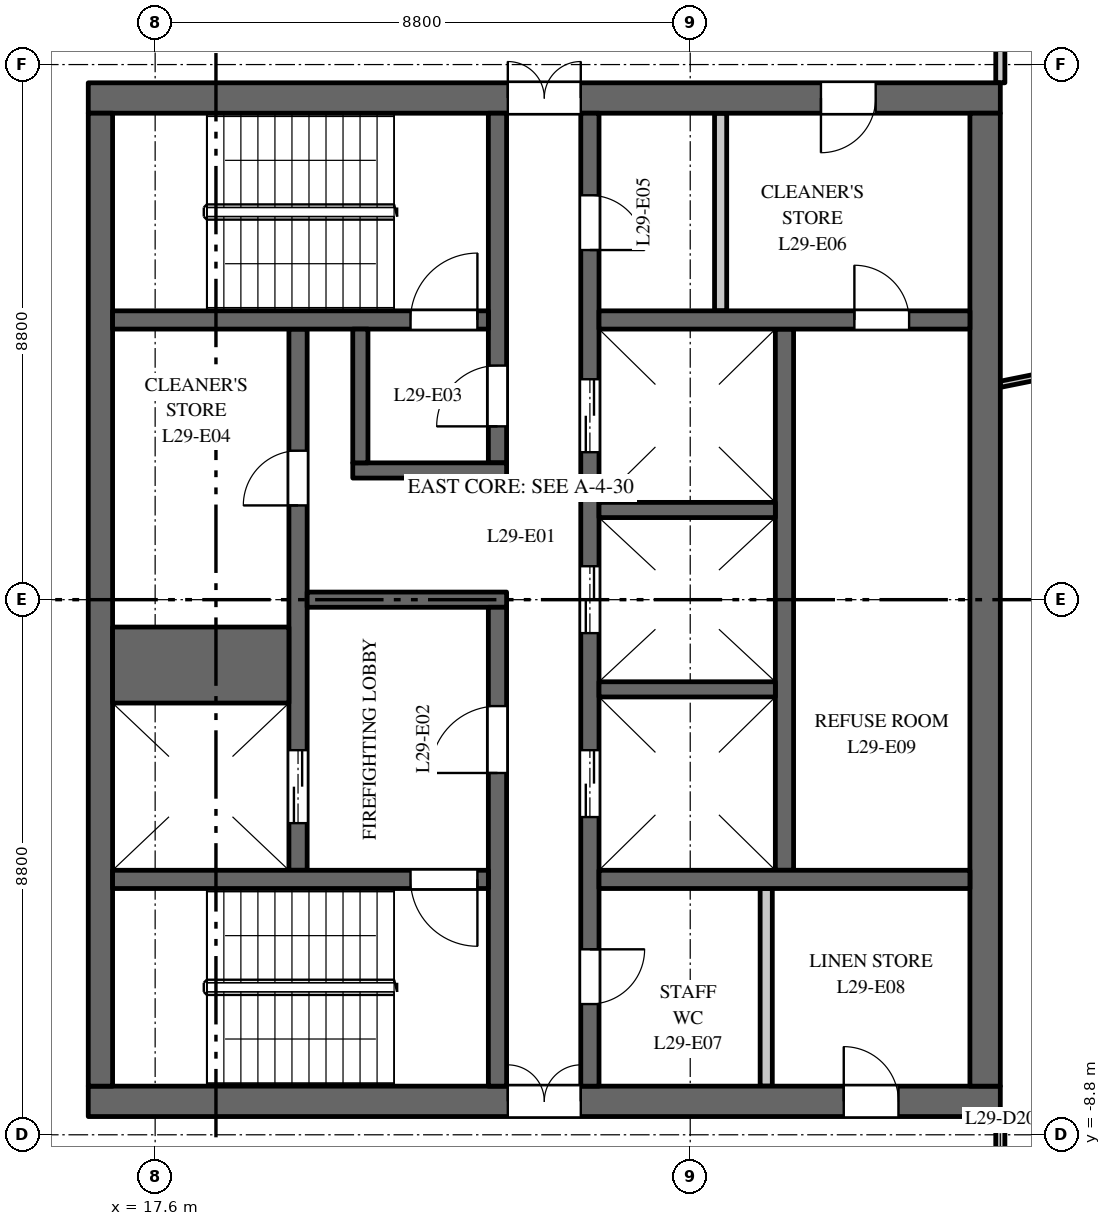
"""IFC4 building model, lengths in metres.
Left out: names, types, materials, properties, quantities, classifications, styles, units other than length and angle.
Written with IfcOpenShell. Run it as: python <this file> out.ifc"""

import sys

from ifc_helpers import new_model, si_unit, direction, frame, frame_2d, origin, place, context, subcontext, project, spatial, rectangle, extrude, element, fill, save


model = new_model("IFC4")
c1 = context("Model", 3, precision=1e-05, world=origin(), true_north=direction((0.0, 1.0)))
c2 = subcontext(c1, "Body", "Model", "MODEL_VIEW")
j1 = project(units=[si_unit("LENGTHUNIT", "METRE"), si_unit("PLANEANGLEUNIT", "RADIAN")], contexts=[c1])
p1 = place(None, origin())
s1 = spatial("IfcSite", under=j1, at=p1, CompositionType="ELEMENT")
p2 = place(p1, origin())
s2 = spatial("IfcBuilding", under=s1, at=p2, CompositionType="ELEMENT")
p3 = place(p2, frame((0.0, 0.0, 128.0)))
s3 = spatial("IfcBuildingStorey", under=s2, at=p3, CompositionType="ELEMENT", Elevation=128.0)
p4 = place(p3, frame((16.5, 8.25, 0.0), z_axis=(0.0, 0.0, 1.0), x_axis=(1.0, 0.0, 0.0)))
e1 = element("IfcWall", 1, at=p4, inside=s3, PredefinedType="SHEAR", context=c2, shape_type="SweptSolid", body=[
    extrude(rectangle(XDim=15.0, YDim=0.5, at=frame_2d((7.5, 0.0))), origin(), (0.0, 0.0, 1.0), 3.7),
])
p5 = place(p4, frame((6.9, 0.0, 0.0)))
e2 = element("IfcOpeningElement", 2, at=p5, cuts=e1, PredefinedType="OPENING", context=c2, shape_type="SweptSolid", body=[
    extrude(rectangle(XDim=1.2, YDim=2.1, at=frame_2d((0.6, 1.05))), frame((0.0, 0.26, 0.0), z_axis=(0.0, -1.0, 0.0), x_axis=(1.0, 0.0, 0.0)), (0.0, 0.0, 1.0), 0.52),
])
p6 = place(p4, frame((12.05, 0.0, 0.0)))
e3 = element("IfcOpeningElement", 3, at=p6, cuts=e1, PredefinedType="OPENING", context=c2, shape_type="SweptSolid", body=[
    extrude(rectangle(XDim=0.9, YDim=2.1, at=frame_2d((0.45, 1.05))), frame((0.0, 0.26, 0.0), z_axis=(0.0, -1.0, 0.0), x_axis=(1.0, 0.0, 0.0)), (0.0, 0.0, 1.0), 0.52),
])
p7 = place(p3, frame((16.5, -8.25, 0.0), z_axis=(0.0, 0.0, 1.0), x_axis=(1.0, 0.0, 0.0)))
e4 = element("IfcWall", 4, at=p7, inside=s3, PredefinedType="SHEAR", context=c2, shape_type="SweptSolid", body=[
    extrude(rectangle(XDim=15.0, YDim=0.5, at=frame_2d((7.5, 0.0))), origin(), (0.0, 0.0, 1.0), 3.7),
])
p8 = place(p7, frame((6.9, 0.0, 0.0)))
e5 = element("IfcOpeningElement", 5, at=p8, cuts=e4, PredefinedType="OPENING", context=c2, shape_type="SweptSolid", body=[
    extrude(rectangle(XDim=1.2, YDim=2.1, at=frame_2d((0.6, 1.05))), frame((0.0, 0.26, 0.0), z_axis=(0.0, -1.0, 0.0), x_axis=(1.0, 0.0, 0.0)), (0.0, 0.0, 1.0), 0.52),
])
p9 = place(p7, frame((12.425, 0.0, 0.0)))
e6 = element("IfcOpeningElement", 6, at=p9, cuts=e4, PredefinedType="OPENING", context=c2, shape_type="SweptSolid", body=[
    extrude(rectangle(XDim=0.9, YDim=2.1, at=frame_2d((0.45, 1.05))), frame((0.0, 0.26, 0.0), z_axis=(0.0, -1.0, 0.0), x_axis=(1.0, 0.0, 0.0)), (0.0, 0.0, 1.0), 0.52),
])
p10 = place(p3, frame((27.95, -4.45, 0.0), z_axis=(0.0, 0.0, 1.0), x_axis=(0.0, 1.0, 0.0)))
e7 = element("IfcWall", 7, at=p10, inside=s3, PredefinedType="SHEAR", context=c2, shape_type="SweptSolid", body=[
    extrude(rectangle(XDim=8.9, YDim=0.3, at=frame_2d((4.45, 0.0))), origin(), (0.0, 0.0, 1.0), 3.7),
])
p11 = place(p3, frame((19.95, -4.45, 0.0), z_axis=(0.0, 0.0, 1.0), x_axis=(0.0, 1.0, 0.0)))
e8 = element("IfcWall", 8, at=p11, inside=s3, PredefinedType="SHEAR", context=c2, shape_type="SweptSolid", body=[
    extrude(rectangle(XDim=8.9, YDim=0.3, at=frame_2d((4.45, 0.0))), origin(), (0.0, 0.0, 1.0), 3.7),
])
p12 = place(p11, frame((0.775, 0.0, 0.0)))
e9 = element("IfcOpeningElement", 9, at=p12, cuts=e8, PredefinedType="OPENING", context=c2, shape_type="SweptSolid", body=[
    extrude(rectangle(XDim=1.2, YDim=2.1, at=frame_2d((0.6, 1.05))), frame((0.0, 0.16, 0.0), z_axis=(0.0, -1.0, 0.0), x_axis=(1.0, 0.0, 0.0)), (0.0, 0.0, 1.0), 0.32),
])
p13 = place(p11, frame((6.0, 0.0, 0.0)))
e10 = element("IfcOpeningElement", 10, at=p13, cuts=e8, PredefinedType="OPENING", context=c2, shape_type="SweptSolid", body=[
    extrude(rectangle(XDim=0.9, YDim=2.1, at=frame_2d((0.45, 1.05))), frame((0.0, 0.16, 0.0), z_axis=(0.0, -1.0, 0.0), x_axis=(1.0, 0.0, 0.0)), (0.0, 0.0, 1.0), 0.32),
])
p14 = place(p3, frame((24.75, -8.0, 0.0), z_axis=(0.0, 0.0, 1.0), x_axis=(0.0, 1.0, 0.0)))
e11 = element("IfcWall", 11, at=p14, inside=s3, PredefinedType="SHEAR", context=c2, shape_type="SweptSolid", body=[
    extrude(rectangle(XDim=16.0, YDim=0.3, at=frame_2d((8.0, 0.0))), origin(), (0.0, 0.0, 1.0), 3.7),
])
p15 = place(p14, frame((4.425, 0.0, 0.0)))
e12 = element("IfcOpeningElement", 12, at=p15, cuts=e11, PredefinedType="OPENING", context=c2, shape_type="SweptSolid", body=[
    extrude(rectangle(XDim=1.1, YDim=2.1, at=frame_2d((0.55, 1.05))), frame((0.0, 0.16, 0.0), z_axis=(0.0, -1.0, 0.0), x_axis=(1.0, 0.0, 0.0)), (0.0, 0.0, 1.0), 0.32),
])
p16 = place(p14, frame((7.45, 0.0, 0.0)))
e13 = element("IfcOpeningElement", 13, at=p16, cuts=e11, PredefinedType="OPENING", context=c2, shape_type="SweptSolid", body=[
    extrude(rectangle(XDim=1.1, YDim=2.1, at=frame_2d((0.55, 1.05))), frame((0.0, 0.16, 0.0), z_axis=(0.0, -1.0, 0.0), x_axis=(1.0, 0.0, 0.0)), (0.0, 0.0, 1.0), 0.32),
])
p17 = place(p14, frame((10.425, 0.0, 0.0)))
e14 = element("IfcOpeningElement", 14, at=p17, cuts=e11, PredefinedType="OPENING", context=c2, shape_type="SweptSolid", body=[
    extrude(rectangle(XDim=1.2, YDim=2.1, at=frame_2d((0.6, 1.05))), frame((0.0, 0.16, 0.0), z_axis=(0.0, -1.0, 0.0), x_axis=(1.0, 0.0, 0.0)), (0.0, 0.0, 1.0), 0.32),
])
p18 = place(p14, frame((13.75, 0.0, 0.0)))
e15 = element("IfcOpeningElement", 15, at=p18, cuts=e11, PredefinedType="OPENING", context=c2, shape_type="SweptSolid", body=[
    extrude(rectangle(XDim=0.9, YDim=2.1, at=frame_2d((0.45, 1.05))), frame((0.0, 0.16, 0.0), z_axis=(0.0, -1.0, 0.0), x_axis=(1.0, 0.0, 0.0)), (0.0, 0.0, 1.0), 0.32),
])
p19 = place(p14, frame((1.35, 0.0, 0.0)))
e16 = element("IfcOpeningElement", 16, at=p19, cuts=e11, PredefinedType="OPENING", context=c2, shape_type="SweptSolid", body=[
    extrude(rectangle(XDim=0.9, YDim=2.1, at=frame_2d((0.45, 1.05))), frame((0.0, 0.16, 0.0), z_axis=(0.0, -1.0, 0.0), x_axis=(1.0, 0.0, 0.0)), (0.0, 0.0, 1.0), 0.32),
])
p20 = place(p3, frame((20.1, 0.0, 0.0), z_axis=(0.0, 0.0, 1.0), x_axis=(1.0, 0.0, 0.0)))
e17 = element("IfcWall", 17, at=p20, inside=s3, PredefinedType="SHEAR", context=c2, shape_type="SweptSolid", body=[
    extrude(rectangle(XDim=3.28, YDim=0.25, at=frame_2d((1.64, 0.0))), origin(), (0.0, 0.0, 1.0), 3.7),
])
p21 = place(p3, frame((16.7, -8.0, 0.0), z_axis=(0.0, 0.0, 1.0), x_axis=(0.0, 1.0, 0.0)))
e18 = element("IfcWall", 18, at=p21, inside=s3, PredefinedType="SHEAR", context=c2, shape_type="SweptSolid", body=[
    extrude(rectangle(XDim=16.0, YDim=0.4, at=frame_2d((8.0, 0.0))), origin(), (0.0, 0.0, 1.0), 3.7),
])
p22 = place(p3, frame((31.25, -8.0, 0.0), z_axis=(0.0, 0.0, 1.0), x_axis=(0.0, 1.0, 0.0)))
e19 = element("IfcWall", 19, at=p22, inside=s3, PredefinedType="SHEAR", context=c2, shape_type="SweptSolid", body=[
    extrude(rectangle(XDim=16.0, YDim=0.5, at=frame_2d((8.0, 0.0))), origin(), (0.0, 0.0, 1.0), 3.7),
])
p23 = place(p3, frame((24.9, 4.6, 0.0), z_axis=(0.0, 0.0, 1.0), x_axis=(1.0, 0.0, 0.0)))
e20 = element("IfcWall", 20, at=p23, inside=s3, PredefinedType="SHEAR", context=c2, shape_type="SweptSolid", body=[
    extrude(rectangle(XDim=6.1, YDim=0.3, at=frame_2d((3.05, 0.0))), origin(), (0.0, 0.0, 1.0), 3.7),
])
p24 = place(p23, frame((4.2, 0.0, 0.0)))
e21 = element("IfcOpeningElement", 21, at=p24, cuts=e20, PredefinedType="OPENING", context=c2, shape_type="SweptSolid", body=[
    extrude(rectangle(XDim=0.9, YDim=2.1, at=frame_2d((0.45, 1.05))), frame((0.0, 0.16, 0.0), z_axis=(0.0, -1.0, 0.0), x_axis=(1.0, 0.0, 0.0)), (0.0, 0.0, 1.0), 0.32),
])
for number, where, z_axis, x_axis in (
    (22, (26.9, 4.75, 0.0), (0.0, 0.0, 1.0), (0.0, 1.0, 0.0)),
    (23, (27.65, -8.0, 0.0), (0.0, 0.0, 1.0), (0.0, 1.0, 0.0)),
):
    element("IfcWall", number, at=place(p3, frame(where, z_axis=z_axis, x_axis=x_axis)), inside=s3, PredefinedType="PARTITIONING", context=c2, shape_type="SweptSolid", body=[
        extrude(rectangle(XDim=3.25, YDim=0.2, at=frame_2d((1.625, 0.0))), origin(), (0.0, 0.0, 1.0), 3.7),
    ])
p25 = place(p3, frame((24.9, -4.6, 0.0), z_axis=(0.0, 0.0, 1.0), x_axis=(1.0, 0.0, 0.0)))
e24 = element("IfcWall", 24, at=p25, inside=s3, PredefinedType="SHEAR", context=c2, shape_type="SweptSolid", body=[
    extrude(rectangle(XDim=6.1, YDim=0.3, at=frame_2d((3.05, 0.0))), origin(), (0.0, 0.0, 1.0), 3.7),
])
p26 = place(p3, frame((16.9, -1.075, 0.0), z_axis=(0.0, 0.0, 1.0), x_axis=(1.0, 0.0, 0.0)))
e25 = element("IfcWall", 25, at=p26, inside=s3, PredefinedType="SHEAR", context=c2, shape_type="SweptSolid", body=[
    extrude(rectangle(XDim=2.9, YDim=1.25, at=frame_2d((1.45, 0.0))), origin(), (0.0, 0.0, 1.0), 3.7),
])
for number, where, z_axis, x_axis in (
    (26, (24.9, -1.475, 0.0), (0.0, 0.0, 1.0), (1.0, 0.0, 0.0)),
    (27, (24.9, 1.475, 0.0), (0.0, 0.0, 1.0), (1.0, 0.0, 0.0)),
):
    element("IfcWall", number, at=place(p3, frame(where, z_axis=z_axis, x_axis=x_axis)), inside=s3, PredefinedType="SHEAR", context=c2, shape_type="SweptSolid", body=[
        extrude(rectangle(XDim=2.9, YDim=0.25, at=frame_2d((1.45, 0.0))), origin(), (0.0, 0.0, 1.0), 3.7),
    ])
p27 = place(p3, frame((23.23, 2.25, 0.0), z_axis=(0.0, 0.0, 1.0), x_axis=(0.0, 1.0, 0.0)))
e28 = element("IfcWall", 28, at=p27, inside=s3, PredefinedType="SHEAR", context=c2, shape_type="SweptSolid", body=[
    extrude(rectangle(XDim=5.75, YDim=0.3, at=frame_2d((2.875, 0.0))), origin(), (0.0, 0.0, 1.0), 3.7),
])
p28 = place(p27, frame((0.6, 0.0, 0.0)))
e29 = element("IfcOpeningElement", 29, at=p28, cuts=e28, PredefinedType="OPENING", context=c2, shape_type="SweptSolid", body=[
    extrude(rectangle(XDim=1.0, YDim=2.1, at=frame_2d((0.5, 1.05))), frame((0.0, 0.16, 0.0), z_axis=(0.0, -1.0, 0.0), x_axis=(1.0, 0.0, 0.0)), (0.0, 0.0, 1.0), 0.32),
])
p29 = place(p3, frame((23.23, -8.0, 0.0), z_axis=(0.0, 0.0, 1.0), x_axis=(0.0, 1.0, 0.0)))
e30 = element("IfcWall", 30, at=p29, inside=s3, PredefinedType="SHEAR", context=c2, shape_type="SweptSolid", body=[
    extrude(rectangle(XDim=7.875, YDim=0.3, at=frame_2d((3.938, 0.0))), origin(), (0.0, 0.0, 1.0), 3.7),
])
p30 = place(p29, frame((5.15, 0.0, 0.0)))
e31 = element("IfcOpeningElement", 31, at=p30, cuts=e30, PredefinedType="OPENING", context=c2, shape_type="SweptSolid", body=[
    extrude(rectangle(XDim=1.1, YDim=2.1, at=frame_2d((0.55, 1.05))), frame((0.0, 0.16, 0.0), z_axis=(0.0, -1.0, 0.0), x_axis=(1.0, 0.0, 0.0)), (0.0, 0.0, 1.0), 0.32),
])
p31 = place(p3, frame((16.9, 4.6, 0.0), z_axis=(0.0, 0.0, 1.0), x_axis=(1.0, 0.0, 0.0)))
e32 = element("IfcWall", 32, at=p31, inside=s3, PredefinedType="SHEAR", context=c2, shape_type="SweptSolid", body=[
    extrude(rectangle(XDim=6.18, YDim=0.3, at=frame_2d((3.09, 0.0))), origin(), (0.0, 0.0, 1.0), 3.7),
])
p32 = place(p31, frame((4.9, 0.0, 0.0)))
e33 = element("IfcOpeningElement", 33, at=p32, cuts=e32, PredefinedType="OPENING", context=c2, shape_type="SweptSolid", body=[
    extrude(rectangle(XDim=1.1, YDim=2.1, at=frame_2d((0.55, 1.05))), frame((0.0, 0.16, 0.0), z_axis=(0.0, -1.0, 0.0), x_axis=(1.0, 0.0, 0.0)), (0.0, 0.0, 1.0), 0.32),
])
p33 = place(p3, frame((16.9, -4.6, 0.0), z_axis=(0.0, 0.0, 1.0), x_axis=(1.0, 0.0, 0.0)))
e34 = element("IfcWall", 34, at=p33, inside=s3, PredefinedType="SHEAR", context=c2, shape_type="SweptSolid", body=[
    extrude(rectangle(XDim=6.18, YDim=0.3, at=frame_2d((3.09, 0.0))), origin(), (0.0, 0.0, 1.0), 3.7),
])
p34 = place(p33, frame((4.9, 0.0, 0.0)))
e35 = element("IfcOpeningElement", 35, at=p34, cuts=e34, PredefinedType="OPENING", context=c2, shape_type="SweptSolid", body=[
    extrude(rectangle(XDim=1.1, YDim=2.1, at=frame_2d((0.55, 1.05))), frame((0.0, 0.16, 0.0), z_axis=(0.0, -1.0, 0.0), x_axis=(1.0, 0.0, 0.0)), (0.0, 0.0, 1.0), 0.32),
])
p35 = place(p3, frame((20.85, 2.125, 0.0), z_axis=(0.0, 0.0, 1.0), x_axis=(1.0, 0.0, 0.0)))
e36 = element("IfcWall", 36, at=p35, inside=s3, PredefinedType="SHEAR", context=c2, shape_type="SweptSolid", body=[
    extrude(rectangle(XDim=2.53, YDim=0.25, at=frame_2d((1.265, 0.0))), origin(), (0.0, 0.0, 1.0), 3.7),
])
p36 = place(p3, frame((20.975, 2.25, 0.0), z_axis=(0.0, 0.0, 1.0), x_axis=(0.0, 1.0, 0.0)))
e37 = element("IfcWall", 37, at=p36, inside=s3, PredefinedType="SHEAR", context=c2, shape_type="SweptSolid", body=[
    extrude(rectangle(XDim=2.2, YDim=0.25, at=frame_2d((1.1, 0.0))), origin(), (0.0, 0.0, 1.0), 3.7),
])
p37 = place(p3, frame((31.5, -10.7, 0.0), z_axis=(0.0, 0.0, 1.0), x_axis=(0.0, 1.0, 0.0)))
e38 = element("IfcWall", 38, at=p37, inside=s3, PredefinedType="PARTITIONING", context=c2, shape_type="SweptSolid", body=[
    extrude(rectangle(XDim=2.2, YDim=0.15, at=frame_2d((1.1, 0.0))), origin(), (0.0, 0.0, 1.0), 2.9),
])
p38 = place(p37, frame((0.65, 0.0, 0.0)))
e39 = element("IfcOpeningElement", 39, at=p38, cuts=e38, PredefinedType="OPENING", context=c2, shape_type="SweptSolid", body=[
    extrude(rectangle(XDim=1.0, YDim=2.1, at=frame_2d((0.5, 1.05))), frame((0.0, 0.085, 0.0), z_axis=(0.0, -1.0, 0.0), x_axis=(1.0, 0.0, 0.0)), (0.0, 0.0, 1.0), 0.17),
])
p39 = place(p3, frame((31.5, 3.542, 0.0), z_axis=(0.0, 0.0, 1.0), x_axis=(0.980357474535, 0.197228857227, 0.0)))
e40 = element("IfcWall", 40, at=p39, inside=s3, PredefinedType="PARTITIONING", context=c2, shape_type="SweptSolid", body=[
    extrude(rectangle(XDim=4.092, YDim=0.1, at=frame_2d((2.046, 0.0))), origin(), (0.0, 0.0, 1.0), 2.9),
])
p40 = place(p3, frame((31.5, 8.5, 0.0), z_axis=(0.0, 0.0, 1.0), x_axis=(0.0, 1.0, 0.0)))
e41 = element("IfcWall", 41, at=p40, inside=s3, PredefinedType="PARTITIONING", context=c2, shape_type="SweptSolid", body=[
    extrude(rectangle(XDim=2.2, YDim=0.15, at=frame_2d((1.1, 0.0))), origin(), (0.0, 0.0, 1.0), 2.9),
])
p41 = place(p12, origin())
e42 = element("IfcDoor", 42, at=p41, inside=s3, OperationType="DOUBLE_DOOR_SLIDING", PredefinedType="DOOR", context=c2, shape_type="SweptSolid", body=[
    extrude(rectangle(XDim=1.2, YDim=2.1, at=frame_2d((0.6, 1.05))), frame((0.0, 0.025, 0.0), z_axis=(0.0, -1.0, 0.0), x_axis=(1.0, 0.0, 0.0)), (0.0, 0.0, 1.0), 0.05),
])
fill(e9, e42)
p42 = place(p15, origin())
e43 = element("IfcDoor", 43, at=p42, inside=s3, OperationType="DOUBLE_DOOR_SLIDING", PredefinedType="DOOR", context=c2, shape_type="SweptSolid", body=[
    extrude(rectangle(XDim=1.1, YDim=2.1, at=frame_2d((0.55, 1.05))), frame((0.0, 0.025, 0.0), z_axis=(0.0, -1.0, 0.0), x_axis=(1.0, 0.0, 0.0)), (0.0, 0.0, 1.0), 0.05),
])
fill(e12, e43)
p43 = place(p16, origin())
e44 = element("IfcDoor", 44, at=p43, inside=s3, OperationType="DOUBLE_DOOR_SLIDING", PredefinedType="DOOR", context=c2, shape_type="SweptSolid", body=[
    extrude(rectangle(XDim=1.1, YDim=2.1, at=frame_2d((0.55, 1.05))), frame((0.0, 0.025, 0.0), z_axis=(0.0, -1.0, 0.0), x_axis=(1.0, 0.0, 0.0)), (0.0, 0.0, 1.0), 0.05),
])
fill(e13, e44)
p44 = place(p17, origin())
e45 = element("IfcDoor", 45, at=p44, inside=s3, OperationType="DOUBLE_DOOR_SLIDING", PredefinedType="DOOR", context=c2, shape_type="SweptSolid", body=[
    extrude(rectangle(XDim=1.2, YDim=2.1, at=frame_2d((0.6, 1.05))), frame((0.0, 0.025, 0.0), z_axis=(0.0, -1.0, 0.0), x_axis=(1.0, 0.0, 0.0)), (0.0, 0.0, 1.0), 0.05),
])
fill(e14, e45)
p45 = place(p32, origin())
e46 = element("IfcDoor", 46, at=p45, inside=s3, OperationType="SINGLE_SWING_LEFT", PredefinedType="DOOR", context=c2, shape_type="SweptSolid", body=[
    extrude(rectangle(XDim=1.1, YDim=2.1, at=frame_2d((0.55, 1.05))), frame((0.0, 0.025, 0.0), z_axis=(0.0, -1.0, 0.0), x_axis=(1.0, 0.0, 0.0)), (0.0, 0.0, 1.0), 0.05),
])
fill(e33, e46)
p46 = place(p34, origin())
e47 = element("IfcDoor", 47, at=p46, inside=s3, OperationType="SINGLE_SWING_RIGHT", PredefinedType="DOOR", context=c2, shape_type="SweptSolid", body=[
    extrude(rectangle(XDim=1.1, YDim=2.1, at=frame_2d((0.55, 1.05))), frame((0.0, 0.025, 0.0), z_axis=(0.0, -1.0, 0.0), x_axis=(1.0, 0.0, 0.0)), (0.0, 0.0, 1.0), 0.05),
])
fill(e35, e47)
p47 = place(p30, origin())
e48 = element("IfcDoor", 48, at=p47, inside=s3, OperationType="SINGLE_SWING_RIGHT", PredefinedType="DOOR", context=c2, shape_type="SweptSolid", body=[
    extrude(rectangle(XDim=1.1, YDim=2.1, at=frame_2d((0.55, 1.05))), frame((0.0, 0.025, 0.0), z_axis=(0.0, -1.0, 0.0), x_axis=(1.0, 0.0, 0.0)), (0.0, 0.0, 1.0), 0.05),
])
fill(e31, e48)
p48 = place(p28, origin())
e49 = element("IfcDoor", 49, at=p48, inside=s3, OperationType="SINGLE_SWING_RIGHT", PredefinedType="DOOR", context=c2, shape_type="SweptSolid", body=[
    extrude(rectangle(XDim=1.0, YDim=2.1, at=frame_2d((0.5, 1.05))), frame((0.0, 0.025, 0.0), z_axis=(0.0, -1.0, 0.0), x_axis=(1.0, 0.0, 0.0)), (0.0, 0.0, 1.0), 0.05),
])
fill(e29, e49)
p49 = place(p5, origin())
e50 = element("IfcDoor", 50, at=p49, inside=s3, OperationType="DOUBLE_DOOR_DOUBLE_SWING", PredefinedType="DOOR", context=c2, shape_type="SweptSolid", body=[
    extrude(rectangle(XDim=1.2, YDim=2.1, at=frame_2d((0.6, 1.05))), frame((0.0, 0.025, 0.0), z_axis=(0.0, -1.0, 0.0), x_axis=(1.0, 0.0, 0.0)), (0.0, 0.0, 1.0), 0.05),
])
fill(e2, e50)
p50 = place(p8, origin())
e51 = element("IfcDoor", 51, at=p50, inside=s3, OperationType="DOUBLE_DOOR_DOUBLE_SWING", PredefinedType="DOOR", context=c2, shape_type="SweptSolid", body=[
    extrude(rectangle(XDim=1.2, YDim=2.1, at=frame_2d((0.6, 1.05))), frame((0.0, 0.025, 0.0), z_axis=(0.0, -1.0, 0.0), x_axis=(1.0, 0.0, 0.0)), (0.0, 0.0, 1.0), 0.05),
])
fill(e5, e51)
p51 = place(p13, origin())
e52 = element("IfcDoor", 52, at=p51, inside=s3, OperationType="SINGLE_SWING_RIGHT", PredefinedType="DOOR", context=c2, shape_type="SweptSolid", body=[
    extrude(rectangle(XDim=0.9, YDim=2.1, at=frame_2d((0.45, 1.05))), frame((0.0, 0.025, 0.0), z_axis=(0.0, -1.0, 0.0), x_axis=(1.0, 0.0, 0.0)), (0.0, 0.0, 1.0), 0.05),
])
fill(e10, e52)
p52 = place(p18, origin())
e53 = element("IfcDoor", 53, at=p52, inside=s3, OperationType="SINGLE_SWING_LEFT", PredefinedType="DOOR", context=c2, shape_type="SweptSolid", body=[
    extrude(rectangle(XDim=0.9, YDim=2.1, at=frame_2d((0.45, 1.05))), frame((0.0, 0.025, 0.0), z_axis=(0.0, -1.0, 0.0), x_axis=(1.0, 0.0, 0.0)), (0.0, 0.0, 1.0), 0.05),
])
fill(e15, e53)
p53 = place(p6, origin())
e54 = element("IfcDoor", 54, at=p53, inside=s3, OperationType="SINGLE_SWING_LEFT", PredefinedType="DOOR", context=c2, shape_type="SweptSolid", body=[
    extrude(rectangle(XDim=0.9, YDim=2.1, at=frame_2d((0.45, 1.05))), frame((0.0, 0.025, 0.0), z_axis=(0.0, -1.0, 0.0), x_axis=(1.0, 0.0, 0.0)), (0.0, 0.0, 1.0), 0.05),
])
fill(e3, e54)
p54 = place(p19, origin())
e55 = element("IfcDoor", 55, at=p54, inside=s3, OperationType="SINGLE_SWING_RIGHT", PredefinedType="DOOR", context=c2, shape_type="SweptSolid", body=[
    extrude(rectangle(XDim=0.9, YDim=2.1, at=frame_2d((0.45, 1.05))), frame((0.0, 0.025, 0.0), z_axis=(0.0, -1.0, 0.0), x_axis=(1.0, 0.0, 0.0)), (0.0, 0.0, 1.0), 0.05),
])
fill(e16, e55)
p55 = place(p9, origin())
e56 = element("IfcDoor", 56, at=p55, inside=s3, OperationType="SINGLE_SWING_RIGHT", PredefinedType="DOOR", context=c2, shape_type="SweptSolid", body=[
    extrude(rectangle(XDim=0.9, YDim=2.1, at=frame_2d((0.45, 1.05))), frame((0.0, 0.025, 0.0), z_axis=(0.0, -1.0, 0.0), x_axis=(1.0, 0.0, 0.0)), (0.0, 0.0, 1.0), 0.05),
])
fill(e6, e56)
p56 = place(p24, origin())
e57 = element("IfcDoor", 57, at=p56, inside=s3, OperationType="SINGLE_SWING_RIGHT", PredefinedType="DOOR", context=c2, shape_type="SweptSolid", body=[
    extrude(rectangle(XDim=0.9, YDim=2.1, at=frame_2d((0.45, 1.05))), frame((0.0, 0.025, 0.0), z_axis=(0.0, -1.0, 0.0), x_axis=(1.0, 0.0, 0.0)), (0.0, 0.0, 1.0), 0.05),
])
fill(e21, e57)
save(model, sys.argv[1])
